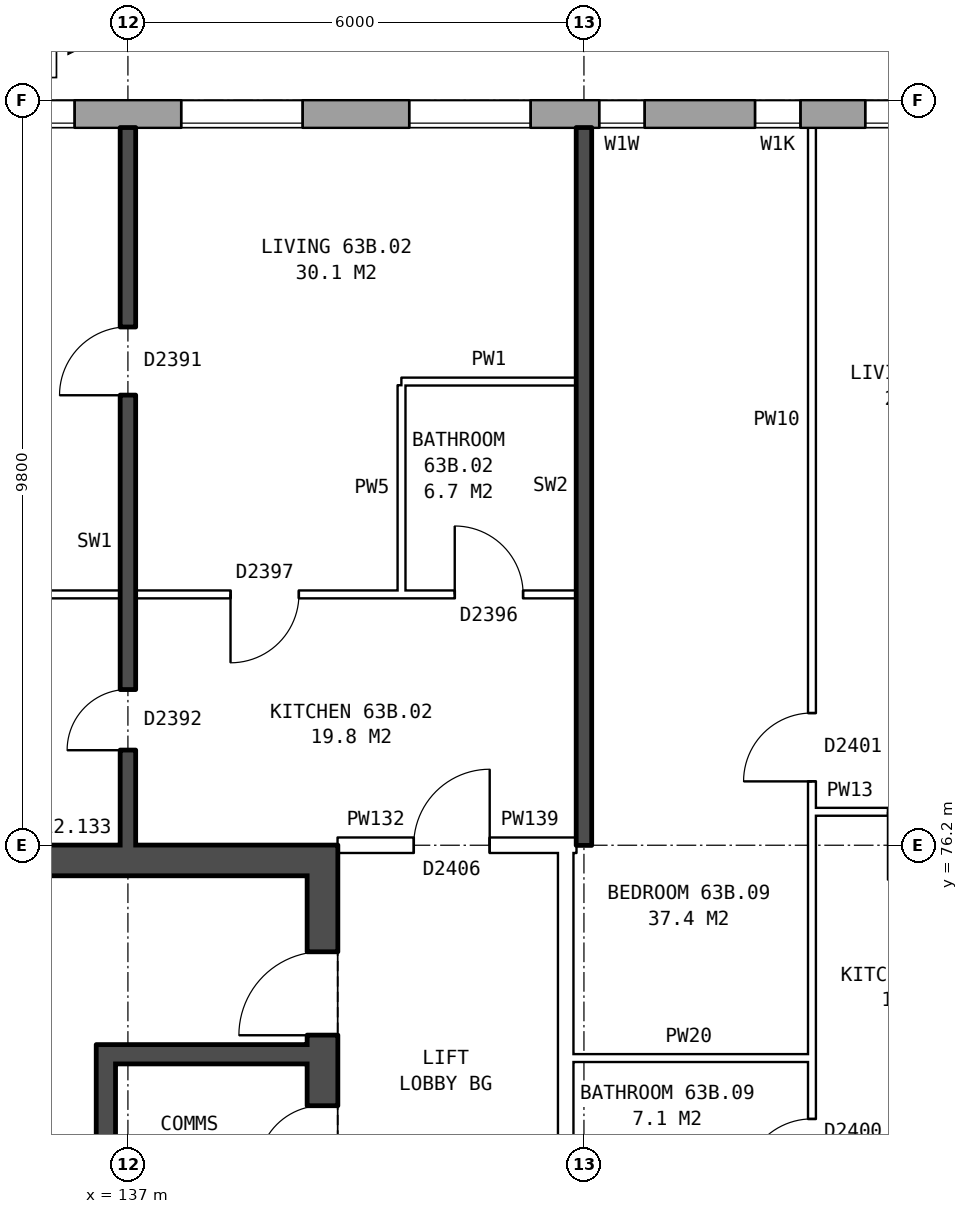
"""IFC4 building model, lengths in metres.
Left out: names, types, materials, properties, quantities, classifications, styles, units other than length and angle.
Written with IfcOpenShell. Run it as: python <this file> out.ifc"""

import sys

from ifc_helpers import new_model, si_unit, direction, frame, frame_2d, origin, place, context, subcontext, project, spatial, rectangle, extrude, element, fill, save


model = new_model("IFC4")
c1 = context("Model", 3, precision=1e-05, world=origin(), true_north=direction((0.0, 1.0)))
c2 = subcontext(c1, "Body", "Model", "MODEL_VIEW")
j1 = project(units=[si_unit("LENGTHUNIT", "METRE"), si_unit("PLANEANGLEUNIT", "RADIAN")], contexts=[c1])
p1 = place(None, origin())
s1 = spatial("IfcSite", under=j1, at=p1, CompositionType="ELEMENT")
p2 = place(p1, origin())
s2 = spatial("IfcBuilding", under=s1, at=p2, CompositionType="ELEMENT")
p3 = place(p2, frame((0.0, 0.0, 224.5)))
s3 = spatial("IfcBuildingStorey", under=s2, at=p3, CompositionType="ELEMENT", Elevation=224.5)
p4 = place(p3, frame((165.925, 85.82, 0.0), z_axis=(0.0, 0.0, 1.0), x_axis=(-1.0, 0.0, 0.0)))
e1 = element("IfcWall", 1, at=p4, inside=s3, PredefinedType="STANDARD", context=c2, shape_type="SweptSolid", body=[
    extrude(rectangle(XDim=33.875, YDim=0.36, at=frame_2d((16.938, 0.0))), origin(), (0.0, 0.0, 1.0), 2.85),
])
p5 = place(p4, frame((2.625, 0.0, 0.8)))
e2 = element("IfcOpeningElement", 2, at=p5, cuts=e1, PredefinedType="OPENING", context=c2, shape_type="SweptSolid", body=[
    extrude(rectangle(XDim=1.6, YDim=1.8, at=frame_2d((0.8, 0.9))), frame((0.0, 0.19, 0.0), z_axis=(0.0, -1.0, 0.0), x_axis=(1.0, 0.0, 0.0)), (0.0, 0.0, 1.0), 0.38),
])
p6 = place(p4, frame((5.625, 0.0, 0.8)))
e3 = element("IfcOpeningElement", 3, at=p6, cuts=e1, PredefinedType="OPENING", context=c2, shape_type="SweptSolid", body=[
    extrude(rectangle(XDim=1.6, YDim=1.8, at=frame_2d((0.8, 0.9))), frame((0.0, 0.19, 0.0), z_axis=(0.0, -1.0, 0.0), x_axis=(1.0, 0.0, 0.0)), (0.0, 0.0, 1.0), 0.38),
])
p7 = place(p4, frame((7.525, 0.0, 0.8)))
e4 = element("IfcOpeningElement", 4, at=p7, cuts=e1, PredefinedType="OPENING", context=c2, shape_type="SweptSolid", body=[
    extrude(rectangle(XDim=1.6, YDim=1.8, at=frame_2d((0.8, 0.9))), frame((0.0, 0.19, 0.0), z_axis=(0.0, -1.0, 0.0), x_axis=(1.0, 0.0, 0.0)), (0.0, 0.0, 1.0), 0.38),
])
p8 = place(p4, frame((11.625, 0.0, 0.8)))
e5 = element("IfcOpeningElement", 5, at=p8, cuts=e1, PredefinedType="OPENING", context=c2, shape_type="SweptSolid", body=[
    extrude(rectangle(XDim=1.6, YDim=1.8, at=frame_2d((0.8, 0.9))), frame((0.0, 0.19, 0.0), z_axis=(0.0, -1.0, 0.0), x_axis=(1.0, 0.0, 0.0)), (0.0, 0.0, 1.0), 0.38),
])
p9 = place(p4, frame((14.625, 0.0, 0.8)))
e6 = element("IfcOpeningElement", 6, at=p9, cuts=e1, PredefinedType="OPENING", context=c2, shape_type="SweptSolid", body=[
    extrude(rectangle(XDim=1.6, YDim=1.8, at=frame_2d((0.8, 0.9))), frame((0.0, 0.19, 0.0), z_axis=(0.0, -1.0, 0.0), x_axis=(1.0, 0.0, 0.0)), (0.0, 0.0, 1.0), 0.38),
])
p10 = place(p4, frame((17.625, 0.0, 0.8)))
e7 = element("IfcOpeningElement", 7, at=p10, cuts=e1, PredefinedType="OPENING", context=c2, shape_type="SweptSolid", body=[
    extrude(rectangle(XDim=1.6, YDim=1.8, at=frame_2d((0.8, 0.9))), frame((0.0, 0.19, 0.0), z_axis=(0.0, -1.0, 0.0), x_axis=(1.0, 0.0, 0.0)), (0.0, 0.0, 1.0), 0.38),
])
p11 = place(p4, frame((20.075, 0.0, 0.8)))
e8 = element("IfcOpeningElement", 8, at=p11, cuts=e1, PredefinedType="OPENING", context=c2, shape_type="SweptSolid", body=[
    extrude(rectangle(XDim=0.6, YDim=1.5, at=frame_2d((0.3, 0.75))), frame((0.0, 0.19, 0.0), z_axis=(0.0, -1.0, 0.0), x_axis=(1.0, 0.0, 0.0)), (0.0, 0.0, 1.0), 0.38),
])
p12 = place(p4, frame((23.625, 0.0, 0.8)))
e9 = element("IfcOpeningElement", 9, at=p12, cuts=e1, PredefinedType="OPENING", context=c2, shape_type="SweptSolid", body=[
    extrude(rectangle(XDim=1.6, YDim=1.8, at=frame_2d((0.8, 0.9))), frame((0.0, 0.19, 0.0), z_axis=(0.0, -1.0, 0.0), x_axis=(1.0, 0.0, 0.0)), (0.0, 0.0, 1.0), 0.38),
])
p13 = place(p4, frame((26.625, 0.0, 0.8)))
e10 = element("IfcOpeningElement", 10, at=p13, cuts=e1, PredefinedType="OPENING", context=c2, shape_type="SweptSolid", body=[
    extrude(rectangle(XDim=1.6, YDim=1.8, at=frame_2d((0.8, 0.9))), frame((0.0, 0.19, 0.0), z_axis=(0.0, -1.0, 0.0), x_axis=(1.0, 0.0, 0.0)), (0.0, 0.0, 1.0), 0.38),
])
p14 = place(p4, frame((29.625, 0.0, 0.8)))
e11 = element("IfcOpeningElement", 11, at=p14, cuts=e1, PredefinedType="OPENING", context=c2, shape_type="SweptSolid", body=[
    extrude(rectangle(XDim=1.6, YDim=1.8, at=frame_2d((0.8, 0.9))), frame((0.0, 0.19, 0.0), z_axis=(0.0, -1.0, 0.0), x_axis=(1.0, 0.0, 0.0)), (0.0, 0.0, 1.0), 0.38),
])
p15 = place(p4, frame((22.125, 0.0, 1.7)))
e12 = element("IfcOpeningElement", 12, at=p15, cuts=e1, PredefinedType="OPENING", context=c2, shape_type="SweptSolid", body=[
    extrude(rectangle(XDim=0.6, YDim=0.9, at=frame_2d((0.3, 0.45))), frame((0.0, 0.19, 0.0), z_axis=(0.0, -1.0, 0.0), x_axis=(1.0, 0.0, 0.0)), (0.0, 0.0, 1.0), 0.38),
])
p16 = place(p3, frame((139.56, 63.8, 0.0), z_axis=(0.0, 0.0, 1.0), x_axis=(0.0, 1.0, 0.0)))
e13 = element("IfcWall", 13, at=p16, inside=s3, PredefinedType="SHEAR", context=c2, shape_type="SweptSolid", body=[
    extrude(rectangle(XDim=12.4, YDim=0.4, at=frame_2d((6.2, 0.0))), origin(), (0.0, 0.0, 1.0), 2.85),
])
p17 = place(p16, frame((1.325, 0.0, 0.0)))
e14 = element("IfcOpeningElement", 14, at=p17, cuts=e13, PredefinedType="OPENING", context=c2, shape_type="SweptSolid", body=[
    extrude(rectangle(XDim=1.1, YDim=2.1, at=frame_2d((0.55, 1.05))), frame((0.0, 0.21, 0.0), z_axis=(0.0, -1.0, 0.0), x_axis=(1.0, 0.0, 0.0)), (0.0, 0.0, 1.0), 0.42),
])
p18 = place(p16, frame((3.6, 0.0, 0.0)))
e15 = element("IfcOpeningElement", 15, at=p18, cuts=e13, PredefinedType="OPENING", context=c2, shape_type="SweptSolid", body=[
    extrude(rectangle(XDim=1.1, YDim=2.1, at=frame_2d((0.55, 1.05))), frame((0.0, 0.21, 0.0), z_axis=(0.0, -1.0, 0.0), x_axis=(1.0, 0.0, 0.0)), (0.0, 0.0, 1.0), 0.42),
])
p19 = place(p16, frame((5.8, 0.0, 0.0)))
e16 = element("IfcOpeningElement", 16, at=p19, cuts=e13, PredefinedType="OPENING", context=c2, shape_type="SweptSolid", body=[
    extrude(rectangle(XDim=1.1, YDim=2.1, at=frame_2d((0.55, 1.05))), frame((0.0, 0.21, 0.0), z_axis=(0.0, -1.0, 0.0), x_axis=(1.0, 0.0, 0.0)), (0.0, 0.0, 1.0), 0.42),
])
p20 = place(p16, frame((9.9, 0.0, 0.0)))
e17 = element("IfcOpeningElement", 17, at=p20, cuts=e13, PredefinedType="OPENING", context=c2, shape_type="SweptSolid", body=[
    extrude(rectangle(XDim=1.1, YDim=2.1, at=frame_2d((0.55, 1.05))), frame((0.0, 0.21, 0.0), z_axis=(0.0, -1.0, 0.0), x_axis=(1.0, 0.0, 0.0)), (0.0, 0.0, 1.0), 0.42),
])
p21 = place(p16, frame((8.125, 0.0, 0.0)))
e18 = element("IfcOpeningElement", 18, at=p21, cuts=e13, PredefinedType="OPENING", context=c2, shape_type="SweptSolid", body=[
    extrude(rectangle(XDim=0.85, YDim=2.1, at=frame_2d((0.425, 1.05))), frame((0.0, 0.21, 0.0), z_axis=(0.0, -1.0, 0.0), x_axis=(1.0, 0.0, 0.0)), (0.0, 0.0, 1.0), 0.42),
])
p22 = place(p3, frame((139.36, 76.0, 0.0), z_axis=(0.0, 0.0, 1.0), x_axis=(-1.0, 0.0, 0.0)))
e19 = element("IfcWall", 19, at=p22, inside=s3, PredefinedType="SHEAR", context=c2, shape_type="SweptSolid", body=[
    extrude(rectangle(XDim=7.6, YDim=0.4, at=frame_2d((3.8, 0.0))), origin(), (0.0, 0.0, 1.0), 2.85),
])
p23 = place(p3, frame((139.36, 73.45, 0.0), z_axis=(0.0, 0.0, 1.0), x_axis=(-1.0, 0.0, 0.0)))
e20 = element("IfcWall", 20, at=p23, inside=s3, PredefinedType="SHEAR", context=c2, shape_type="SweptSolid", body=[
    extrude(rectangle(XDim=2.525, YDim=0.25, at=frame_2d((1.263, 0.0))), origin(), (0.0, 0.0, 1.0), 2.85),
])
p24 = place(p3, frame((136.71, 71.375, 0.0), z_axis=(0.0, 0.0, 1.0), x_axis=(0.0, 1.0, 0.0)))
e21 = element("IfcWall", 21, at=p24, inside=s3, PredefinedType="SHEAR", context=c2, shape_type="SweptSolid", body=[
    extrude(rectangle(XDim=2.2, YDim=0.25, at=frame_2d((1.1, 0.0))), origin(), (0.0, 0.0, 1.0), 2.85),
])
p25 = place(p3, frame((142.76, 63.9, 0.0), z_axis=(0.0, 0.0, 1.0), x_axis=(0.0, 1.0, 0.0)))
e22 = element("IfcWall", 22, at=p25, inside=s3, PredefinedType="PARTITIONING", context=c2, shape_type="SweptSolid", body=[
    extrude(rectangle(XDim=12.2, YDim=0.2, at=frame_2d((6.1, 0.0))), origin(), (0.0, 0.0, 1.0), 2.85),
])
p26 = place(p25, frame((5.1, 0.0, 0.0)))
e23 = element("IfcOpeningElement", 23, at=p26, cuts=e22, PredefinedType="OPENING", context=c2, shape_type="SweptSolid", body=[
    extrude(rectangle(XDim=2.0, YDim=2.1, at=frame_2d((1.0, 1.05))), frame((0.0, 0.11, 0.0), z_axis=(0.0, -1.0, 0.0), x_axis=(1.0, 0.0, 0.0)), (0.0, 0.0, 1.0), 0.22),
])
p27 = place(p3, frame((142.76, 73.4, 0.0), z_axis=(0.0, 0.0, 1.0), x_axis=(1.0, 0.0, 0.0)))
e24 = element("IfcWall", 24, at=p27, inside=s3, PredefinedType="PARTITIONING", context=c2, shape_type="SweptSolid", body=[
    extrude(rectangle(XDim=3.24, YDim=0.1, at=frame_2d((1.62, 0.0))), origin(), (0.0, 0.0, 1.0), 2.85),
])
p28 = place(p3, frame((139.76, 76.2, 0.0), z_axis=(0.0, 0.0, 1.0), x_axis=(1.0, 0.0, 0.0)))
e25 = element("IfcWall", 25, at=p28, inside=s3, PredefinedType="PARTITIONING", context=c2, shape_type="SweptSolid", body=[
    extrude(rectangle(XDim=3.0, YDim=0.2, at=frame_2d((1.5, 0.0))), origin(), (0.0, 0.0, 1.0), 2.85),
])
p29 = place(p28, frame((1.0, 0.0, 0.0)))
e26 = element("IfcOpeningElement", 26, at=p29, cuts=e25, PredefinedType="OPENING", context=c2, shape_type="SweptSolid", body=[
    extrude(rectangle(XDim=1.0, YDim=2.1, at=frame_2d((0.5, 1.05))), frame((0.0, 0.11, 0.0), z_axis=(0.0, -1.0, 0.0), x_axis=(1.0, 0.0, 0.0)), (0.0, 0.0, 1.0), 0.22),
])
p30 = place(p3, frame((142.76, 76.2, 0.0), z_axis=(0.0, 0.0, 1.0), x_axis=(1.0, 0.0, 0.0)))
e27 = element("IfcWall", 27, at=p30, inside=s3, PredefinedType="PARTITIONING", context=c2, shape_type="SweptSolid", body=[
    extrude(rectangle(XDim=0.14, YDim=0.2, at=frame_2d((0.07, 0.0))), origin(), (0.0, 0.0, 1.0), 2.85),
])
p31 = place(p3, frame((146.0, 76.64, 0.0), z_axis=(0.0, 0.0, 1.0), x_axis=(1.0, 0.0, 0.0)))
e28 = element("IfcWall", 28, at=p31, inside=s3, PredefinedType="PARTITIONING", context=c2, shape_type="SweptSolid", body=[
    extrude(rectangle(XDim=2.9, YDim=0.1, at=frame_2d((1.45, 0.0))), origin(), (0.0, 0.0, 1.0), 2.85),
])
p32 = place(p31, frame((1.0, 0.0, 0.0)))
e29 = element("IfcOpeningElement", 29, at=p32, cuts=e28, PredefinedType="OPENING", context=c2, shape_type="SweptSolid", body=[
    extrude(rectangle(XDim=0.9, YDim=2.1, at=frame_2d((0.45, 1.05))), frame((0.0, 0.06, 0.0), z_axis=(0.0, -1.0, 0.0), x_axis=(1.0, 0.0, 0.0)), (0.0, 0.0, 1.0), 0.12),
])
p33 = place(p3, frame((131.1, 79.5, 0.0), z_axis=(0.0, 0.0, 1.0), x_axis=(1.0, 0.0, 0.0)))
e30 = element("IfcWall", 30, at=p33, inside=s3, PredefinedType="PARTITIONING", context=c2, shape_type="SweptSolid", body=[
    extrude(rectangle(XDim=11.8, YDim=0.1, at=frame_2d((5.9, 0.0))), origin(), (0.0, 0.0, 1.0), 2.85),
])
p34 = place(p33, frame((7.25, 0.0, 0.0)))
e31 = element("IfcOpeningElement", 31, at=p34, cuts=e30, PredefinedType="OPENING", context=c2, shape_type="SweptSolid", body=[
    extrude(rectangle(XDim=0.9, YDim=2.1, at=frame_2d((0.45, 1.05))), frame((0.0, 0.06, 0.0), z_axis=(0.0, -1.0, 0.0), x_axis=(1.0, 0.0, 0.0)), (0.0, 0.0, 1.0), 0.12),
])
p35 = place(p33, frame((10.2, 0.0, 0.0)))
e32 = element("IfcOpeningElement", 32, at=p35, cuts=e30, PredefinedType="OPENING", context=c2, shape_type="SweptSolid", body=[
    extrude(rectangle(XDim=0.9, YDim=2.1, at=frame_2d((0.45, 1.05))), frame((0.0, 0.06, 0.0), z_axis=(0.0, -1.0, 0.0), x_axis=(1.0, 0.0, 0.0)), (0.0, 0.0, 1.0), 0.12),
])
p36 = place(p3, frame((140.6, 82.3, 0.0), z_axis=(0.0, 0.0, 1.0), x_axis=(1.0, 0.0, 0.0)))
e33 = element("IfcWall", 33, at=p36, inside=s3, PredefinedType="PARTITIONING", context=c2, shape_type="SweptSolid", body=[
    extrude(rectangle(XDim=2.3, YDim=0.1, at=frame_2d((1.15, 0.0))), origin(), (0.0, 0.0, 1.0), 2.85),
])
p37 = place(p3, frame((137.0, 76.2, 0.0), z_axis=(0.0, 0.0, 1.0), x_axis=(0.0, 1.0, 0.0)))
e34 = element("IfcWall", 34, at=p37, inside=s3, PredefinedType="SOLIDWALL", context=c2, shape_type="SweptSolid", body=[
    extrude(rectangle(XDim=9.44, YDim=0.2, at=frame_2d((4.72, 0.0))), origin(), (0.0, 0.0, 1.0), 2.85),
])
p38 = place(p37, frame((5.92, 0.0, 0.0)))
e35 = element("IfcOpeningElement", 35, at=p38, cuts=e34, PredefinedType="OPENING", context=c2, shape_type="SweptSolid", body=[
    extrude(rectangle(XDim=0.9, YDim=2.1, at=frame_2d((0.45, 1.05))), frame((0.0, 0.11, 0.0), z_axis=(0.0, -1.0, 0.0), x_axis=(1.0, 0.0, 0.0)), (0.0, 0.0, 1.0), 0.22),
])
p39 = place(p37, frame((1.25, 0.0, 0.0)))
e36 = element("IfcOpeningElement", 36, at=p39, cuts=e34, PredefinedType="OPENING", context=c2, shape_type="SweptSolid", body=[
    extrude(rectangle(XDim=0.8, YDim=2.1, at=frame_2d((0.4, 1.05))), frame((0.0, 0.11, 0.0), z_axis=(0.0, -1.0, 0.0), x_axis=(1.0, 0.0, 0.0)), (0.0, 0.0, 1.0), 0.22),
])
p40 = place(p3, frame((140.6, 79.55, 0.0), z_axis=(0.0, 0.0, 1.0), x_axis=(0.0, 1.0, 0.0)))
e37 = element("IfcWall", 37, at=p40, inside=s3, PredefinedType="PARTITIONING", context=c2, shape_type="SweptSolid", body=[
    extrude(rectangle(XDim=2.7, YDim=0.1, at=frame_2d((1.35, 0.0))), origin(), (0.0, 0.0, 1.0), 2.85),
])
p41 = place(p3, frame((143.0, 76.2, 0.0), z_axis=(0.0, 0.0, 1.0), x_axis=(0.0, 1.0, 0.0)))
e38 = element("IfcWall", 38, at=p41, inside=s3, PredefinedType="SOLIDWALL", context=c2, shape_type="SweptSolid", body=[
    extrude(rectangle(XDim=9.44, YDim=0.2, at=frame_2d((4.72, 0.0))), origin(), (0.0, 0.0, 1.0), 2.85),
])
p42 = place(p3, frame((146.0, 71.3, 0.0), z_axis=(0.0, 0.0, 1.0), x_axis=(0.0, 1.0, 0.0)))
e39 = element("IfcWall", 39, at=p42, inside=s3, PredefinedType="PARTITIONING", context=c2, shape_type="SweptSolid", body=[
    extrude(rectangle(XDim=14.34, YDim=0.1, at=frame_2d((7.17, 0.0))), origin(), (0.0, 0.0, 1.0), 2.85),
])
p43 = place(p42, frame((5.74, 0.0, 0.0)))
e40 = element("IfcOpeningElement", 40, at=p43, cuts=e39, PredefinedType="OPENING", context=c2, shape_type="SweptSolid", body=[
    extrude(rectangle(XDim=0.9, YDim=2.1, at=frame_2d((0.45, 1.05))), frame((0.0, 0.06, 0.0), z_axis=(0.0, -1.0, 0.0), x_axis=(1.0, 0.0, 0.0)), (0.0, 0.0, 1.0), 0.12),
])
p44 = place(p42, frame((0.4, 0.0, 0.0)))
e41 = element("IfcOpeningElement", 41, at=p44, cuts=e39, PredefinedType="OPENING", context=c2, shape_type="SweptSolid", body=[
    extrude(rectangle(XDim=0.9, YDim=2.1, at=frame_2d((0.45, 1.05))), frame((0.0, 0.06, 0.0), z_axis=(0.0, -1.0, 0.0), x_axis=(1.0, 0.0, 0.0)), (0.0, 0.0, 1.0), 0.12),
])
p45 = place(p10, origin())
e42 = element("IfcWindow", 42, at=p45, inside=s3, PartitioningType="SINGLE_PANEL", PredefinedType="WINDOW", context=c2, shape_type="SweptSolid", body=[
    extrude(rectangle(XDim=1.6, YDim=1.8, at=frame_2d((0.8, 0.9))), frame((0.0, 0.15, 0.0), z_axis=(0.0, -1.0, 0.0), x_axis=(1.0, 0.0, 0.0)), (0.0, 0.0, 1.0), 0.06),
])
fill(e7, e42)
p46 = place(p11, origin())
e43 = element("IfcWindow", 43, at=p46, inside=s3, PartitioningType="SINGLE_PANEL", PredefinedType="WINDOW", context=c2, shape_type="SweptSolid", body=[
    extrude(rectangle(XDim=0.6, YDim=1.5, at=frame_2d((0.3, 0.75))), frame((0.0, 0.15, 0.0), z_axis=(0.0, -1.0, 0.0), x_axis=(1.0, 0.0, 0.0)), (0.0, 0.0, 1.0), 0.06),
])
fill(e8, e43)
p47 = place(p12, origin())
e44 = element("IfcWindow", 44, at=p47, inside=s3, PartitioningType="SINGLE_PANEL", PredefinedType="WINDOW", context=c2, shape_type="SweptSolid", body=[
    extrude(rectangle(XDim=1.6, YDim=1.8, at=frame_2d((0.8, 0.9))), frame((0.0, 0.15, 0.0), z_axis=(0.0, -1.0, 0.0), x_axis=(1.0, 0.0, 0.0)), (0.0, 0.0, 1.0), 0.06),
])
fill(e9, e44)
p48 = place(p13, origin())
e45 = element("IfcWindow", 45, at=p48, inside=s3, PartitioningType="SINGLE_PANEL", PredefinedType="WINDOW", context=c2, shape_type="SweptSolid", body=[
    extrude(rectangle(XDim=1.6, YDim=1.8, at=frame_2d((0.8, 0.9))), frame((0.0, 0.15, 0.0), z_axis=(0.0, -1.0, 0.0), x_axis=(1.0, 0.0, 0.0)), (0.0, 0.0, 1.0), 0.06),
])
fill(e10, e45)
p49 = place(p14, origin())
e46 = element("IfcWindow", 46, at=p49, inside=s3, PartitioningType="SINGLE_PANEL", PredefinedType="WINDOW", context=c2, shape_type="SweptSolid", body=[
    extrude(rectangle(XDim=1.6, YDim=1.8, at=frame_2d((0.8, 0.9))), frame((0.0, 0.15, 0.0), z_axis=(0.0, -1.0, 0.0), x_axis=(1.0, 0.0, 0.0)), (0.0, 0.0, 1.0), 0.06),
])
fill(e11, e46)
p50 = place(p20, origin())
e47 = element("IfcDoor", 47, at=p50, inside=s3, OperationType="SINGLE_SWING_LEFT", PredefinedType="DOOR", context=c2, shape_type="SweptSolid", body=[
    extrude(rectangle(XDim=1.1, YDim=2.1, at=frame_2d((0.55, 1.05))), frame((0.0, 0.185, 0.0), z_axis=(0.0, -1.0, 0.0), x_axis=(1.0, 0.0, 0.0)), (0.0, 0.0, 1.0), 0.05),
])
fill(e17, e47)
p51 = place(p21, origin())
e48 = element("IfcDoor", 48, at=p51, inside=s3, OperationType="SINGLE_SWING_LEFT", PredefinedType="DOOR", context=c2, shape_type="SweptSolid", body=[
    extrude(rectangle(XDim=0.85, YDim=2.1, at=frame_2d((0.425, 1.05))), frame((0.0, 0.185, 0.0), z_axis=(0.0, -1.0, 0.0), x_axis=(1.0, 0.0, 0.0)), (0.0, 0.0, 1.0), 0.05),
])
fill(e18, e48)
p52 = place(p38, origin())
e49 = element("IfcDoor", 49, at=p52, inside=s3, OperationType="SINGLE_SWING_LEFT", PredefinedType="DOOR", context=c2, shape_type="SweptSolid", body=[
    extrude(rectangle(XDim=0.9, YDim=2.1, at=frame_2d((0.45, 1.05))), frame((0.0, 0.025, 0.0), z_axis=(0.0, -1.0, 0.0), x_axis=(1.0, 0.0, 0.0)), (0.0, 0.0, 1.0), 0.05),
])
fill(e35, e49)
p53 = place(p29, origin())
e50 = element("IfcDoor", 50, at=p53, inside=s3, OperationType="SINGLE_SWING_RIGHT", PredefinedType="DOOR", context=c2, shape_type="SweptSolid", body=[
    extrude(rectangle(XDim=1.0, YDim=2.1, at=frame_2d((0.5, 1.05))), frame((0.0, 0.025, 0.0), z_axis=(0.0, -1.0, 0.0), x_axis=(1.0, 0.0, 0.0)), (0.0, 0.0, 1.0), 0.05),
])
fill(e26, e50)
p54 = place(p34, frame((0.9, 0.0, 0.0), z_axis=(0.0, 0.0, 1.0), x_axis=(-1.0, 0.0, 0.0)))
e51 = element("IfcDoor", 51, at=p54, inside=s3, OperationType="SINGLE_SWING_RIGHT", PredefinedType="DOOR", context=c2, shape_type="SweptSolid", body=[
    extrude(rectangle(XDim=0.9, YDim=2.1, at=frame_2d((0.45, 1.05))), frame((0.0, 0.025, 0.0), z_axis=(0.0, -1.0, 0.0), x_axis=(1.0, 0.0, 0.0)), (0.0, 0.0, 1.0), 0.05),
])
fill(e31, e51)
p55 = place(p39, origin())
e52 = element("IfcDoor", 52, at=p55, inside=s3, OperationType="SINGLE_SWING_LEFT", PredefinedType="DOOR", context=c2, shape_type="SweptSolid", body=[
    extrude(rectangle(XDim=0.8, YDim=2.1, at=frame_2d((0.4, 1.05))), frame((0.0, 0.025, 0.0), z_axis=(0.0, -1.0, 0.0), x_axis=(1.0, 0.0, 0.0)), (0.0, 0.0, 1.0), 0.05),
])
fill(e36, e52)
p56 = place(p35, origin())
e53 = element("IfcDoor", 53, at=p56, inside=s3, OperationType="SINGLE_SWING_LEFT", PredefinedType="DOOR", context=c2, shape_type="SweptSolid", body=[
    extrude(rectangle(XDim=0.9, YDim=2.1, at=frame_2d((0.45, 1.05))), frame((0.0, 0.025, 0.0), z_axis=(0.0, -1.0, 0.0), x_axis=(1.0, 0.0, 0.0)), (0.0, 0.0, 1.0), 0.05),
])
fill(e32, e53)
p57 = place(p43, origin())
e54 = element("IfcDoor", 54, at=p57, inside=s3, OperationType="SINGLE_SWING_LEFT", PredefinedType="DOOR", context=c2, shape_type="SweptSolid", body=[
    extrude(rectangle(XDim=0.9, YDim=2.1, at=frame_2d((0.45, 1.05))), frame((0.0, 0.025, 0.0), z_axis=(0.0, -1.0, 0.0), x_axis=(1.0, 0.0, 0.0)), (0.0, 0.0, 1.0), 0.05),
])
fill(e40, e54)
p58 = place(p44, origin())
e55 = element("IfcDoor", 55, at=p58, inside=s3, OperationType="SINGLE_SWING_LEFT", PredefinedType="DOOR", context=c2, shape_type="SweptSolid", body=[
    extrude(rectangle(XDim=0.9, YDim=2.1, at=frame_2d((0.45, 1.05))), frame((0.0, 0.025, 0.0), z_axis=(0.0, -1.0, 0.0), x_axis=(1.0, 0.0, 0.0)), (0.0, 0.0, 1.0), 0.05),
])
fill(e41, e55)
p59 = place(p15, origin())
e56 = element("IfcWindow", 56, at=p59, inside=s3, PartitioningType="SINGLE_PANEL", PredefinedType="WINDOW", context=c2, shape_type="SweptSolid", body=[
    extrude(rectangle(XDim=0.6, YDim=0.9, at=frame_2d((0.3, 0.45))), frame((0.0, 0.15, 0.0), z_axis=(0.0, -1.0, 0.0), x_axis=(1.0, 0.0, 0.0)), (0.0, 0.0, 1.0), 0.06),
])
fill(e12, e56)
save(model, sys.argv[1])
